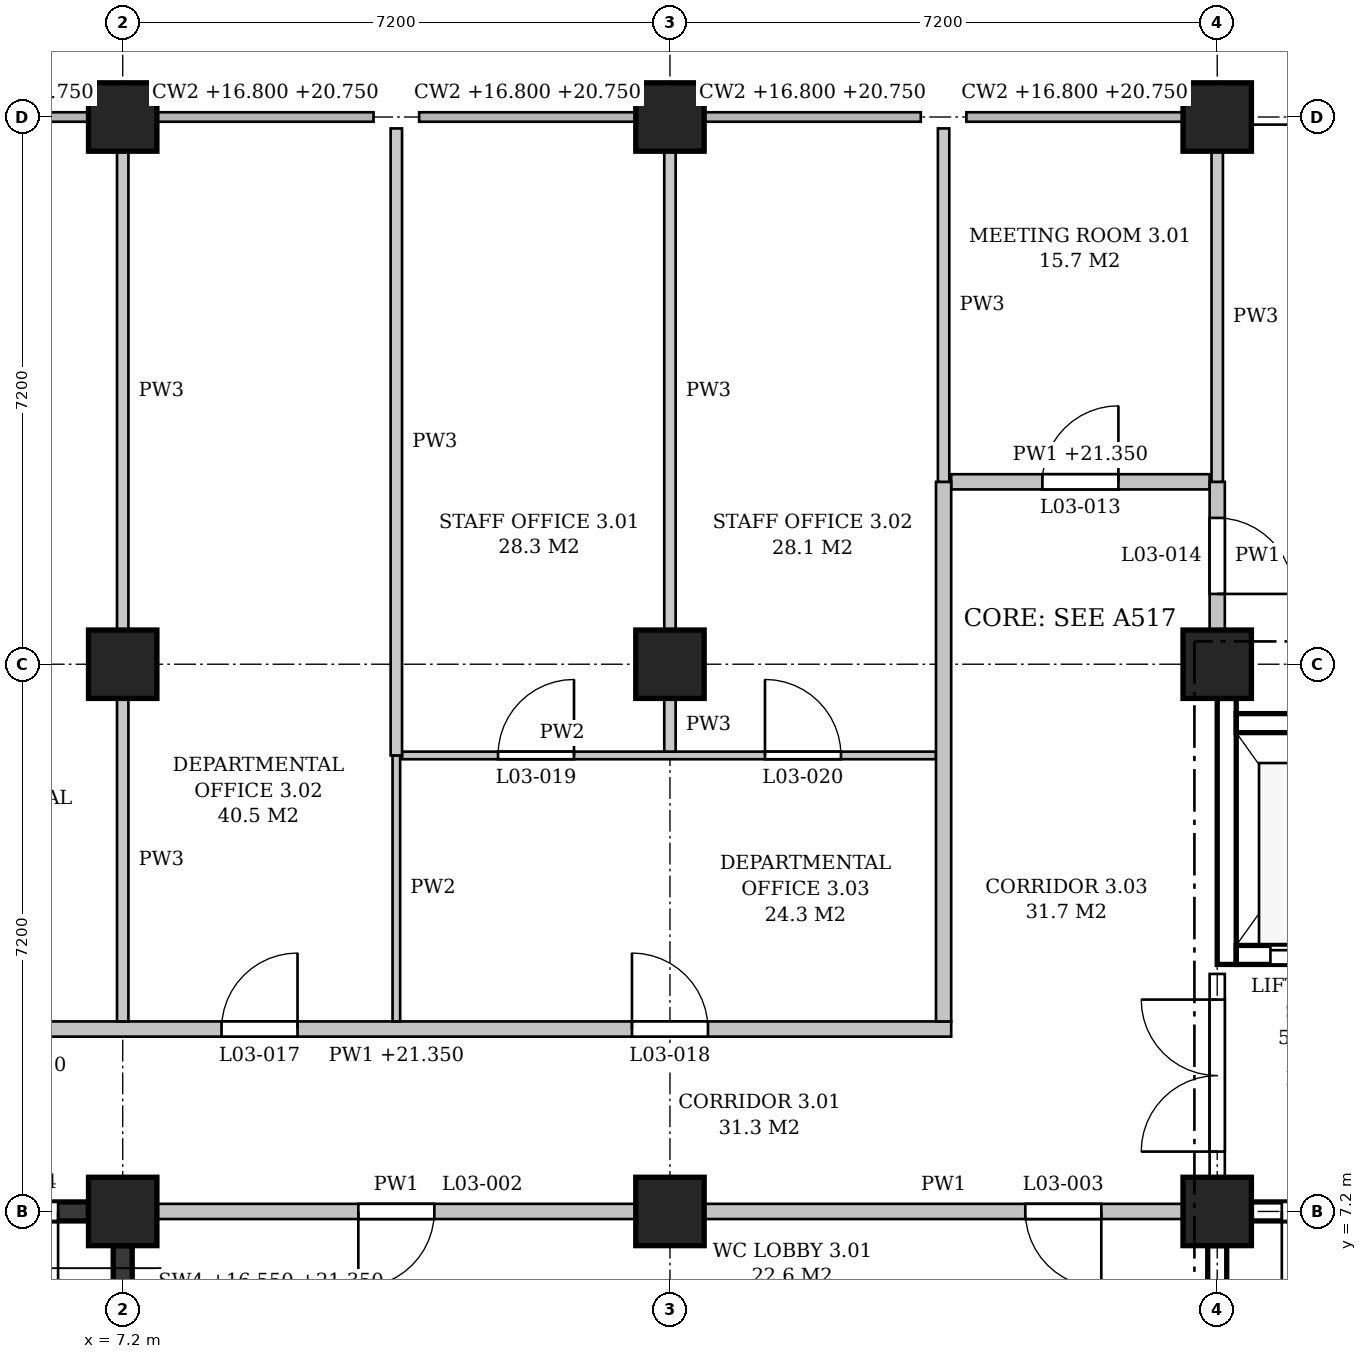
"""IFC4 building model, lengths in metres.
Left out: names, types, materials, properties, quantities, classifications, styles, units other than length and angle.
Written with IfcOpenShell. Run it as: python <this file> out.ifc"""

import sys

from ifc_helpers import new_model, si_unit, direction, frame, frame_2d, origin, origin_2d, place, context, subcontext, project, spatial, polyline, rectangle, outline, extrude, element, fill, save


model = new_model("IFC4")
c1 = context("Model", 3, precision=1e-05, world=origin(), true_north=direction((0.0, 1.0)))
c2 = subcontext(c1, "Body", "Model", "MODEL_VIEW")
j1 = project(units=[si_unit("LENGTHUNIT", "METRE"), si_unit("PLANEANGLEUNIT", "RADIAN")], contexts=[c1])
p1 = place(None, origin())
s1 = spatial("IfcSite", under=j1, at=p1, CompositionType="ELEMENT")
p2 = place(p1, origin())
s2 = spatial("IfcBuilding", under=s1, at=p2, CompositionType="ELEMENT")
p3 = place(p2, frame((0.0, 0.0, 16.8)))
s3 = spatial("IfcBuildingStorey", under=s2, at=p3, CompositionType="ELEMENT", Elevation=16.8)
for number, where, z_axis, x_axis in (
    (1, (7.2, 7.2, 0.0), (0.0, 0.0, 1.0), (1.0, 0.0, 0.0)),
    (2, (7.2, 14.4, 0.0), (0.0, 0.0, 1.0), (1.0, 0.0, 0.0)),
    (3, (7.2, 21.6, 0.0), (0.0, 0.0, 1.0), (1.0, 0.0, 0.0)),
    (4, (14.4, 7.2, 0.0), (0.0, 0.0, 1.0), (1.0, 0.0, 0.0)),
    (5, (14.4, 14.4, 0.0), (0.0, 0.0, 1.0), (1.0, 0.0, 0.0)),
    (6, (14.4, 21.6, 0.0), (0.0, 0.0, 1.0), (1.0, 0.0, 0.0)),
    (7, (21.6, 7.2, 0.0), (0.0, 0.0, 1.0), (1.0, 0.0, 0.0)),
    (8, (21.6, 14.4, 0.0), (0.0, 0.0, 1.0), (1.0, 0.0, 0.0)),
    (9, (21.6, 21.6, 0.0), (0.0, 0.0, 1.0), (1.0, 0.0, 0.0)),
):
    element("IfcColumn", number, at=place(p3, frame(where, z_axis=z_axis, x_axis=x_axis)), inside=s3, PredefinedType="COLUMN", context=c2, shape_type="SweptSolid", body=[
        extrude(rectangle(XDim=0.9, YDim=0.9, at=origin_2d()), origin(), (0.0, 0.0, 1.0), 4.8),
    ])
p4 = place(p3, frame((0.45, 7.2, 0.0), z_axis=(0.0, 0.0, 1.0), x_axis=(1.0, 0.0, 0.0)))
e10 = element("IfcWall", 10, at=p4, inside=s3, PredefinedType="SHEAR", context=c2, shape_type="SweptSolid", body=[
    extrude(rectangle(XDim=6.3, YDim=0.25, at=frame_2d((3.15, 0.0))), origin(), (0.0, 0.0, 1.0), 3.8),
])
p5 = place(p4, frame((4.8, 0.0, 0.0)))
e11 = element("IfcOpeningElement", 11, at=p5, cuts=e10, PredefinedType="OPENING", context=c2, shape_type="SweptSolid", body=[
    extrude(rectangle(XDim=1.1, YDim=2.1, at=frame_2d((0.55, 1.05))), frame((0.0, 0.135, 0.0), z_axis=(0.0, -1.0, 0.0), x_axis=(1.0, 0.0, 0.0)), (0.0, 0.0, 1.0), 0.27),
])
p6 = place(p3, frame((7.2, 0.45, 0.0), z_axis=(0.0, 0.0, 1.0), x_axis=(0.0, 1.0, 0.0)))
e12 = element("IfcWall", 12, at=p6, inside=s3, PredefinedType="SHEAR", context=c2, shape_type="SweptSolid", body=[
    extrude(rectangle(XDim=6.3, YDim=0.25, at=frame_2d((3.15, 0.0))), origin(), (0.0, 0.0, 1.0), 3.8),
])
p7 = place(p3, frame((22.05, 7.2, 0.0), z_axis=(0.0, 0.0, 1.0), x_axis=(1.0, 0.0, 0.0)))
e13 = element("IfcWall", 13, at=p7, inside=s3, PredefinedType="SHEAR", context=c2, shape_type="SweptSolid", body=[
    extrude(rectangle(XDim=6.3, YDim=0.25, at=frame_2d((3.15, 0.0))), origin(), (0.0, 0.0, 1.0), 3.8),
])
p8 = place(p7, frame((0.4, 0.0, 0.0)))
e14 = element("IfcOpeningElement", 14, at=p8, cuts=e13, PredefinedType="OPENING", context=c2, shape_type="SweptSolid", body=[
    extrude(rectangle(XDim=1.1, YDim=2.1, at=frame_2d((0.55, 1.05))), frame((0.0, 0.135, 0.0), z_axis=(0.0, -1.0, 0.0), x_axis=(1.0, 0.0, 0.0)), (0.0, 0.0, 1.0), 0.27),
])
p9 = place(p3, frame((21.6, 0.45, 0.0), z_axis=(0.0, 0.0, 1.0), x_axis=(0.0, 1.0, 0.0)))
e15 = element("IfcWall", 15, at=p9, inside=s3, PredefinedType="SHEAR", context=c2, shape_type="SweptSolid", body=[
    extrude(rectangle(XDim=6.3, YDim=0.25, at=frame_2d((3.15, 0.0))), origin(), (0.0, 0.0, 1.0), 3.8),
])
p10 = place(p3, frame((21.725, 10.45, -0.25), z_axis=(0.0, 0.0, 1.0), x_axis=(0.0, 1.0, 0.0)))
e16 = element("IfcWall", 16, at=p10, inside=s3, PredefinedType="SHEAR", context=c2, shape_type="SweptSolid", body=[
    extrude(rectangle(XDim=3.5, YDim=0.25, at=frame_2d((1.75, 0.0))), origin(), (0.0, 0.0, 1.0), 4.05),
])
p11 = place(p3, frame((21.85, 10.575, -0.25), z_axis=(0.0, 0.0, 1.0), x_axis=(1.0, 0.0, 0.0)))
e17 = element("IfcWall", 17, at=p11, inside=s3, PredefinedType="SHEAR", context=c2, shape_type="SweptSolid", body=[
    extrude(rectangle(XDim=2.0, YDim=0.25, at=frame_2d((1.0, 0.0))), origin(), (0.0, 0.0, 1.0), 4.8),
])
p12 = place(p11, frame((0.45, 0.0, 0.25)))
e18 = element("IfcOpeningElement", 18, at=p12, cuts=e17, PredefinedType="OPENING", context=c2, shape_type="SweptSolid", body=[
    extrude(rectangle(XDim=1.1, YDim=2.1, at=frame_2d((0.55, 1.05))), frame((0.0, 0.135, 0.0), z_axis=(0.0, -1.0, 0.0), x_axis=(1.0, 0.0, 0.0)), (0.0, 0.0, 1.0), 0.27),
])
p13 = place(p3, frame((21.85, 13.625, -0.25), z_axis=(0.0, 0.0, 1.0), x_axis=(1.0, 0.0, 0.0)))
e19 = element("IfcWall", 19, at=p13, inside=s3, PredefinedType="SHEAR", context=c2, shape_type="SweptSolid", body=[
    extrude(rectangle(XDim=2.0, YDim=0.25, at=frame_2d((1.0, 0.0))), origin(), (0.0, 0.0, 1.0), 4.8),
])
p14 = place(p3, frame((7.65, 7.2, 0.0), z_axis=(0.0, 0.0, 1.0), x_axis=(1.0, 0.0, 0.0)))
e20 = element("IfcWall", 20, at=p14, inside=s3, PredefinedType="PARTITIONING", context=c2, shape_type="SweptSolid", body=[
    extrude(rectangle(XDim=6.3, YDim=0.2, at=frame_2d((3.15, 0.0))), origin(), (0.0, 0.0, 1.0), 3.8),
])
p15 = place(p14, frame((2.65, 0.0, 0.0)))
e21 = element("IfcOpeningElement", 21, at=p15, cuts=e20, PredefinedType="OPENING", context=c2, shape_type="SweptSolid", body=[
    extrude(rectangle(XDim=1.0, YDim=2.1, at=frame_2d((0.5, 1.05))), frame((0.0, 0.11, 0.0), z_axis=(0.0, -1.0, 0.0), x_axis=(1.0, 0.0, 0.0)), (0.0, 0.0, 1.0), 0.22),
])
p16 = place(p3, frame((14.85, 7.2, 0.0), z_axis=(0.0, 0.0, 1.0), x_axis=(1.0, 0.0, 0.0)))
e22 = element("IfcWall", 22, at=p16, inside=s3, PredefinedType="PARTITIONING", context=c2, shape_type="SweptSolid", body=[
    extrude(rectangle(XDim=6.3, YDim=0.2, at=frame_2d((3.15, 0.0))), origin(), (0.0, 0.0, 1.0), 3.8),
])
p17 = place(p16, frame((4.225, 0.0, 0.0)))
e23 = element("IfcOpeningElement", 23, at=p17, cuts=e22, PredefinedType="OPENING", context=c2, shape_type="SweptSolid", body=[
    extrude(rectangle(XDim=1.0, YDim=2.1, at=frame_2d((0.5, 1.05))), frame((0.0, 0.11, 0.0), z_axis=(0.0, -1.0, 0.0), x_axis=(1.0, 0.0, 0.0)), (0.0, 0.0, 1.0), 0.22),
])
p18 = place(p3, frame((3.5, 9.6, 0.0), z_axis=(0.0, 0.0, 1.0), x_axis=(1.0, 0.0, 0.0)))
e24 = element("IfcWall", 24, at=p18, inside=s3, PredefinedType="PARTITIONING", context=c2, shape_type="SweptSolid", body=[
    extrude(outline(polyline([(0.0, 0.0), (14.6, 0.0), (14.6, 4.55), (11.15, 4.55), (11.15, 3.8), (10.65, 3.8), (10.65, 4.55), (3.95, 4.55), (3.95, 3.8), (3.45, 3.8), (3.45, 4.55), (0.0, 4.55), (0.0, 0.0)])), frame((0.0, 0.1, 0.0), z_axis=(0.0, -1.0, 0.0), x_axis=(1.0, 0.0, 0.0)), (0.0, 0.0, 1.0), 0.2),
])
p19 = place(p18, frame((1.4, 0.0, 0.0)))
e25 = element("IfcOpeningElement", 25, at=p19, cuts=e24, PredefinedType="OPENING", context=c2, shape_type="SweptSolid", body=[
    extrude(rectangle(XDim=1.0, YDim=2.1, at=frame_2d((0.5, 1.05))), frame((0.0, 0.11, 0.0), z_axis=(0.0, -1.0, 0.0), x_axis=(1.0, 0.0, 0.0)), (0.0, 0.0, 1.0), 0.22),
])
p20 = place(p18, frame((5.0, 0.0, 0.0)))
e26 = element("IfcOpeningElement", 26, at=p20, cuts=e24, PredefinedType="OPENING", context=c2, shape_type="SweptSolid", body=[
    extrude(rectangle(XDim=1.0, YDim=2.1, at=frame_2d((0.5, 1.05))), frame((0.0, 0.11, 0.0), z_axis=(0.0, -1.0, 0.0), x_axis=(1.0, 0.0, 0.0)), (0.0, 0.0, 1.0), 0.22),
])
p21 = place(p18, frame((10.4, 0.0, 0.0)))
e27 = element("IfcOpeningElement", 27, at=p21, cuts=e24, PredefinedType="OPENING", context=c2, shape_type="SweptSolid", body=[
    extrude(rectangle(XDim=1.0, YDim=2.1, at=frame_2d((0.5, 1.05))), frame((0.0, 0.11, 0.0), z_axis=(0.0, -1.0, 0.0), x_axis=(1.0, 0.0, 0.0)), (0.0, 0.0, 1.0), 0.22),
])
p22 = place(p3, frame((10.875, 13.2, 0.0), z_axis=(0.0, 0.0, 1.0), x_axis=(1.0, 0.0, 0.0)))
e28 = element("IfcWall", 28, at=p22, inside=s3, PredefinedType="PARTITIONING", context=c2, shape_type="SweptSolid", body=[
    extrude(rectangle(XDim=7.025, YDim=0.1, at=frame_2d((3.512, 0.0))), origin(), (0.0, 0.0, 1.0), 3.8),
])
p23 = place(p22, frame((1.262, 0.0, 0.0)))
e29 = element("IfcOpeningElement", 29, at=p23, cuts=e28, PredefinedType="OPENING", context=c2, shape_type="SweptSolid", body=[
    extrude(rectangle(XDim=1.0, YDim=2.1, at=frame_2d((0.5, 1.05))), frame((0.0, 0.06, 0.0), z_axis=(0.0, -1.0, 0.0), x_axis=(1.0, 0.0, 0.0)), (0.0, 0.0, 1.0), 0.12),
])
p24 = place(p22, frame((4.775, 0.0, 0.0)))
e30 = element("IfcOpeningElement", 30, at=p24, cuts=e28, PredefinedType="OPENING", context=c2, shape_type="SweptSolid", body=[
    extrude(rectangle(XDim=1.0, YDim=2.1, at=frame_2d((0.5, 1.05))), frame((0.0, 0.06, 0.0), z_axis=(0.0, -1.0, 0.0), x_axis=(1.0, 0.0, 0.0)), (0.0, 0.0, 1.0), 0.12),
])
p25 = place(p3, frame((18.1, 16.8, 0.0), z_axis=(0.0, 0.0, 1.0), x_axis=(1.0, 0.0, 0.0)))
e31 = element("IfcWall", 31, at=p25, inside=s3, PredefinedType="PARTITIONING", context=c2, shape_type="SweptSolid", body=[
    extrude(outline(polyline([(0.0, 0.0), (3.4, 0.0), (3.4, 3.8), (3.25, 3.8), (3.25, 4.55), (0.0, 4.55), (0.0, 0.0)])), frame((0.0, 0.1, 0.0), z_axis=(0.0, -1.0, 0.0), x_axis=(1.0, 0.0, 0.0)), (0.0, 0.0, 1.0), 0.2),
])
p26 = place(p25, frame((1.2, 0.0, 0.0)))
e32 = element("IfcOpeningElement", 32, at=p26, cuts=e31, PredefinedType="OPENING", context=c2, shape_type="SweptSolid", body=[
    extrude(rectangle(XDim=1.0, YDim=2.1, at=frame_2d((0.5, 1.05))), frame((0.0, 0.11, 0.0), z_axis=(0.0, -1.0, 0.0), x_axis=(1.0, 0.0, 0.0)), (0.0, 0.0, 1.0), 0.22),
])
p27 = place(p3, frame((7.2, 9.7, 0.0), z_axis=(0.0, 0.0, 1.0), x_axis=(0.0, 1.0, 0.0)))
e33 = element("IfcWall", 33, at=p27, inside=s3, PredefinedType="PARTITIONING", context=c2, shape_type="SweptSolid", body=[
    extrude(rectangle(XDim=4.25, YDim=0.15, at=frame_2d((2.125, 0.0))), origin(), (0.0, 0.0, 1.0), 3.8),
])
p28 = place(p3, frame((7.2, 14.85, 0.0), z_axis=(0.0, 0.0, 1.0), x_axis=(0.0, 1.0, 0.0)))
e34 = element("IfcWall", 34, at=p28, inside=s3, PredefinedType="PARTITIONING", context=c2, shape_type="SweptSolid", body=[
    extrude(rectangle(XDim=6.3, YDim=0.15, at=frame_2d((3.15, 0.0))), origin(), (0.0, 0.0, 1.0), 3.8),
])
p29 = place(p3, frame((10.8, 9.7, 0.0), z_axis=(0.0, 0.0, 1.0), x_axis=(0.0, 1.0, 0.0)))
e35 = element("IfcWall", 35, at=p29, inside=s3, PredefinedType="PARTITIONING", context=c2, shape_type="SweptSolid", body=[
    extrude(rectangle(XDim=3.5, YDim=0.1, at=frame_2d((1.75, 0.0))), origin(), (0.0, 0.0, 1.0), 3.8),
])
p30 = place(p3, frame((10.8, 13.2, 0.0), z_axis=(0.0, 0.0, 1.0), x_axis=(0.0, 1.0, 0.0)))
e36 = element("IfcWall", 36, at=p30, inside=s3, PredefinedType="PARTITIONING", context=c2, shape_type="SweptSolid", body=[
    extrude(rectangle(XDim=8.25, YDim=0.15, at=frame_2d((4.125, 0.0))), origin(), (0.0, 0.0, 1.0), 3.8),
])
p31 = place(p3, frame((14.4, 13.25, 0.0), z_axis=(0.0, 0.0, 1.0), x_axis=(0.0, 1.0, 0.0)))
e37 = element("IfcWall", 37, at=p31, inside=s3, PredefinedType="PARTITIONING", context=c2, shape_type="SweptSolid", body=[
    extrude(rectangle(XDim=0.7, YDim=0.15, at=frame_2d((0.35, 0.0))), origin(), (0.0, 0.0, 1.0), 3.8),
])
p32 = place(p3, frame((14.4, 14.85, 0.0), z_axis=(0.0, 0.0, 1.0), x_axis=(0.0, 1.0, 0.0)))
e38 = element("IfcWall", 38, at=p32, inside=s3, PredefinedType="PARTITIONING", context=c2, shape_type="SweptSolid", body=[
    extrude(rectangle(XDim=6.3, YDim=0.15, at=frame_2d((3.15, 0.0))), origin(), (0.0, 0.0, 1.0), 3.8),
])
p33 = place(p3, frame((18.0, 9.7, 0.0), z_axis=(0.0, 0.0, 1.0), x_axis=(0.0, 1.0, 0.0)))
e39 = element("IfcWall", 39, at=p33, inside=s3, PredefinedType="PARTITIONING", context=c2, shape_type="SweptSolid", body=[
    extrude(outline(polyline([(0.0, 0.0), (7.1, 0.0), (7.1, 4.55), (4.95, 4.55), (4.95, 3.8), (4.45, 3.8), (4.45, 4.55), (0.0, 4.55), (0.0, 0.0)])), frame((0.0, 0.1, 0.0), z_axis=(0.0, -1.0, 0.0), x_axis=(1.0, 0.0, 0.0)), (0.0, 0.0, 1.0), 0.2),
])
p34 = place(p3, frame((18.0, 16.8, 0.0), z_axis=(0.0, 0.0, 1.0), x_axis=(0.0, 1.0, 0.0)))
e40 = element("IfcWall", 40, at=p34, inside=s3, PredefinedType="PARTITIONING", context=c2, shape_type="SweptSolid", body=[
    extrude(rectangle(XDim=4.65, YDim=0.15, at=frame_2d((2.325, 0.0))), origin(), (0.0, 0.0, 1.0), 3.8),
])
p35 = place(p3, frame((21.6, 7.65, 0.0), z_axis=(0.0, 0.0, 1.0), x_axis=(0.0, 1.0, 0.0)))
e41 = element("IfcWall", 41, at=p35, inside=s3, PredefinedType="PARTITIONING", context=c2, shape_type="SweptSolid", body=[
    extrude(rectangle(XDim=2.675, YDim=0.2, at=frame_2d((1.337, 0.0))), origin(), (0.0, 0.0, 1.0), 3.8),
])
p36 = place(p35, frame((0.337, 0.0, 0.0)))
e42 = element("IfcOpeningElement", 42, at=p36, cuts=e41, PredefinedType="OPENING", context=c2, shape_type="SweptSolid", body=[
    extrude(rectangle(XDim=2.0, YDim=2.4, at=frame_2d((1.0, 1.2))), frame((0.0, 0.11, 0.0), z_axis=(0.0, -1.0, 0.0), x_axis=(1.0, 0.0, 0.0)), (0.0, 0.0, 1.0), 0.22),
])
p37 = place(p3, frame((21.6, 14.85, 0.0), z_axis=(0.0, 0.0, 1.0), x_axis=(0.0, 1.0, 0.0)))
e43 = element("IfcWall", 43, at=p37, inside=s3, PredefinedType="PARTITIONING", context=c2, shape_type="SweptSolid", body=[
    extrude(rectangle(XDim=1.95, YDim=0.2, at=frame_2d((0.975, 0.0))), origin(), (0.0, 0.0, 1.0), 3.8),
])
p38 = place(p37, frame((0.475, 0.0, 0.0)))
e44 = element("IfcOpeningElement", 44, at=p38, cuts=e43, PredefinedType="OPENING", context=c2, shape_type="SweptSolid", body=[
    extrude(rectangle(XDim=1.0, YDim=2.1, at=frame_2d((0.5, 1.05))), frame((0.0, 0.11, 0.0), z_axis=(0.0, -1.0, 0.0), x_axis=(1.0, 0.0, 0.0)), (0.0, 0.0, 1.0), 0.22),
])
p39 = place(p3, frame((21.6, 16.8, 0.0), z_axis=(0.0, 0.0, 1.0), x_axis=(0.0, 1.0, 0.0)))
e45 = element("IfcWall", 45, at=p39, inside=s3, PredefinedType="PARTITIONING", context=c2, shape_type="SweptSolid", body=[
    extrude(rectangle(XDim=4.35, YDim=0.15, at=frame_2d((2.175, 0.0))), origin(), (0.0, 0.0, 1.0), 3.8),
])
p40 = place(p5, frame((1.1, 0.0, 0.0), z_axis=(0.0, 0.0, 1.0), x_axis=(-1.0, 0.0, 0.0)))
e46 = element("IfcDoor", 46, at=p40, inside=s3, OperationType="SINGLE_SWING_LEFT", PredefinedType="DOOR", context=c2, shape_type="SweptSolid", body=[
    extrude(rectangle(XDim=1.1, YDim=2.1, at=frame_2d((0.55, 1.05))), frame((0.0, 0.025, 0.0), z_axis=(0.0, -1.0, 0.0), x_axis=(1.0, 0.0, 0.0)), (0.0, 0.0, 1.0), 0.05),
])
fill(e11, e46)
p41 = place(p8, frame((1.1, 0.0, 0.0), z_axis=(0.0, 0.0, 1.0), x_axis=(-1.0, 0.0, 0.0)))
e47 = element("IfcDoor", 47, at=p41, inside=s3, OperationType="SINGLE_SWING_RIGHT", PredefinedType="DOOR", context=c2, shape_type="SweptSolid", body=[
    extrude(rectangle(XDim=1.1, YDim=2.1, at=frame_2d((0.55, 1.05))), frame((0.0, 0.025, 0.0), z_axis=(0.0, -1.0, 0.0), x_axis=(1.0, 0.0, 0.0)), (0.0, 0.0, 1.0), 0.05),
])
fill(e14, e47)
p42 = place(p12, origin())
e48 = element("IfcDoor", 48, at=p42, inside=s3, OperationType="SLIDING_TO_LEFT", PredefinedType="DOOR", context=c2, shape_type="SweptSolid", body=[
    extrude(rectangle(XDim=1.1, YDim=2.1, at=frame_2d((0.55, 1.05))), frame((0.0, 0.025, 0.0), z_axis=(0.0, -1.0, 0.0), x_axis=(1.0, 0.0, 0.0)), (0.0, 0.0, 1.0), 0.05),
])
fill(e18, e48)
p43 = place(p36, origin())
e49 = element("IfcDoor", 49, at=p43, inside=s3, OperationType="DOUBLE_DOOR_SINGLE_SWING", PredefinedType="DOOR", context=c2, shape_type="SweptSolid", body=[
    extrude(rectangle(XDim=2.0, YDim=2.4, at=frame_2d((1.0, 1.2))), frame((0.0, 0.025, 0.0), z_axis=(0.0, -1.0, 0.0), x_axis=(1.0, 0.0, 0.0)), (0.0, 0.0, 1.0), 0.05),
])
fill(e42, e49)
p44 = place(p15, frame((1.0, 0.0, 0.0), z_axis=(0.0, 0.0, 1.0), x_axis=(-1.0, 0.0, 0.0)))
e50 = element("IfcDoor", 50, at=p44, inside=s3, OperationType="SINGLE_SWING_RIGHT", PredefinedType="DOOR", context=c2, shape_type="SweptSolid", body=[
    extrude(rectangle(XDim=1.0, YDim=2.1, at=frame_2d((0.5, 1.05))), frame((0.0, 0.025, 0.0), z_axis=(0.0, -1.0, 0.0), x_axis=(1.0, 0.0, 0.0)), (0.0, 0.0, 1.0), 0.05),
])
fill(e21, e50)
p45 = place(p17, frame((1.0, 0.0, 0.0), z_axis=(0.0, 0.0, 1.0), x_axis=(-1.0, 0.0, 0.0)))
e51 = element("IfcDoor", 51, at=p45, inside=s3, OperationType="SINGLE_SWING_LEFT", PredefinedType="DOOR", context=c2, shape_type="SweptSolid", body=[
    extrude(rectangle(XDim=1.0, YDim=2.1, at=frame_2d((0.5, 1.05))), frame((0.0, 0.025, 0.0), z_axis=(0.0, -1.0, 0.0), x_axis=(1.0, 0.0, 0.0)), (0.0, 0.0, 1.0), 0.05),
])
fill(e23, e51)
p46 = place(p26, origin())
e52 = element("IfcDoor", 52, at=p46, inside=s3, OperationType="SINGLE_SWING_RIGHT", PredefinedType="DOOR", context=c2, shape_type="SweptSolid", body=[
    extrude(rectangle(XDim=1.0, YDim=2.1, at=frame_2d((0.5, 1.05))), frame((0.0, 0.025, 0.0), z_axis=(0.0, -1.0, 0.0), x_axis=(1.0, 0.0, 0.0)), (0.0, 0.0, 1.0), 0.05),
])
fill(e32, e52)
p47 = place(p38, frame((1.0, 0.0, 0.0), z_axis=(0.0, 0.0, 1.0), x_axis=(-1.0, 0.0, 0.0)))
e53 = element("IfcDoor", 53, at=p47, inside=s3, OperationType="SINGLE_SWING_RIGHT", PredefinedType="DOOR", context=c2, shape_type="SweptSolid", body=[
    extrude(rectangle(XDim=1.0, YDim=2.1, at=frame_2d((0.5, 1.05))), frame((0.0, 0.025, 0.0), z_axis=(0.0, -1.0, 0.0), x_axis=(1.0, 0.0, 0.0)), (0.0, 0.0, 1.0), 0.05),
])
fill(e44, e53)
p48 = place(p20, origin())
e54 = element("IfcDoor", 54, at=p48, inside=s3, OperationType="SINGLE_SWING_RIGHT", PredefinedType="DOOR", context=c2, shape_type="SweptSolid", body=[
    extrude(rectangle(XDim=1.0, YDim=2.1, at=frame_2d((0.5, 1.05))), frame((0.0, 0.025, 0.0), z_axis=(0.0, -1.0, 0.0), x_axis=(1.0, 0.0, 0.0)), (0.0, 0.0, 1.0), 0.05),
])
fill(e26, e54)
p49 = place(p21, origin())
e55 = element("IfcDoor", 55, at=p49, inside=s3, OperationType="SINGLE_SWING_LEFT", PredefinedType="DOOR", context=c2, shape_type="SweptSolid", body=[
    extrude(rectangle(XDim=1.0, YDim=2.1, at=frame_2d((0.5, 1.05))), frame((0.0, 0.025, 0.0), z_axis=(0.0, -1.0, 0.0), x_axis=(1.0, 0.0, 0.0)), (0.0, 0.0, 1.0), 0.05),
])
fill(e27, e55)
p50 = place(p23, origin())
e56 = element("IfcDoor", 56, at=p50, inside=s3, OperationType="SINGLE_SWING_RIGHT", PredefinedType="DOOR", context=c2, shape_type="SweptSolid", body=[
    extrude(rectangle(XDim=1.0, YDim=2.1, at=frame_2d((0.5, 1.05))), frame((0.0, 0.025, 0.0), z_axis=(0.0, -1.0, 0.0), x_axis=(1.0, 0.0, 0.0)), (0.0, 0.0, 1.0), 0.05),
])
fill(e29, e56)
p51 = place(p24, origin())
e57 = element("IfcDoor", 57, at=p51, inside=s3, OperationType="SINGLE_SWING_LEFT", PredefinedType="DOOR", context=c2, shape_type="SweptSolid", body=[
    extrude(rectangle(XDim=1.0, YDim=2.1, at=frame_2d((0.5, 1.05))), frame((0.0, 0.025, 0.0), z_axis=(0.0, -1.0, 0.0), x_axis=(1.0, 0.0, 0.0)), (0.0, 0.0, 1.0), 0.05),
])
fill(e30, e57)
save(model, sys.argv[1])
